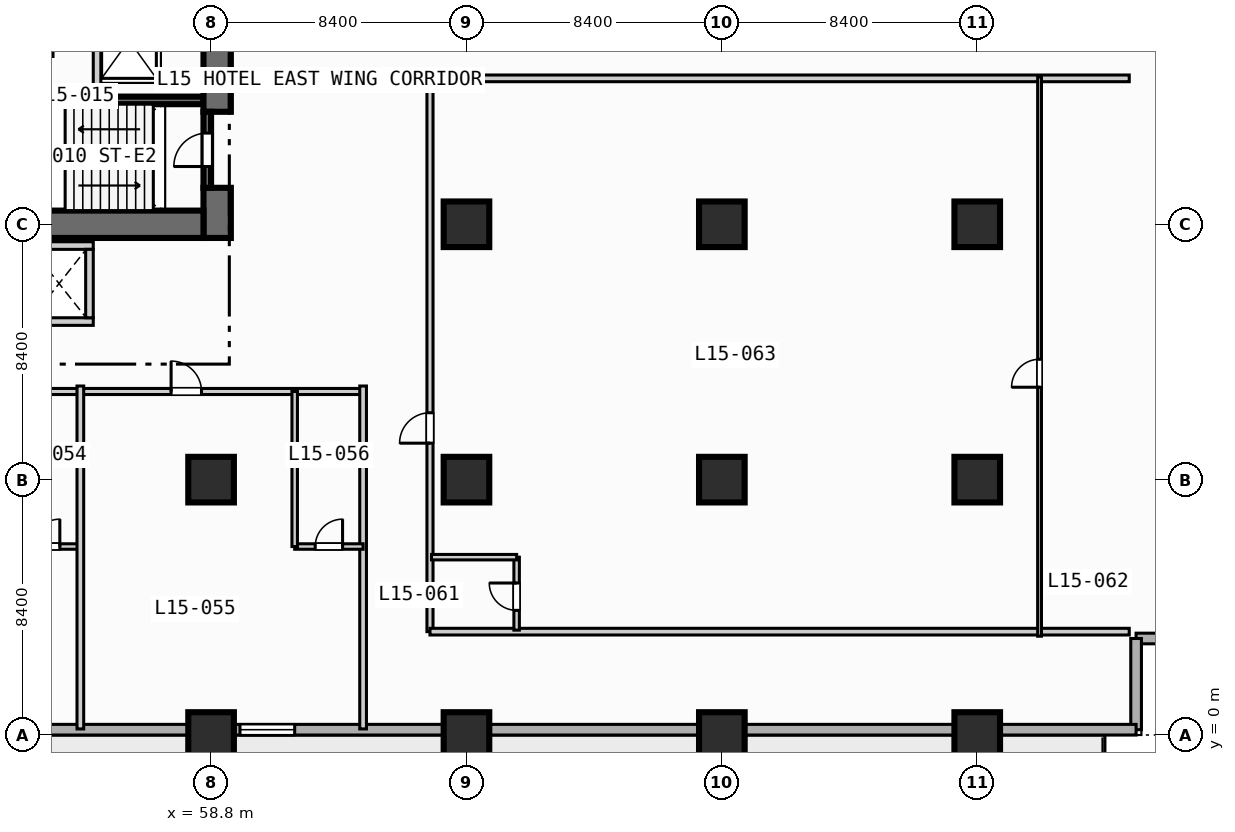
"""IFC4 building model, lengths in metres.
Left out: names, types, materials, properties, quantities, classifications, styles, units other than length and angle.
Written with IfcOpenShell. Run it as: python <this file> out.ifc"""

import sys

from ifc_helpers import new_model, si_unit, direction, frame, frame_2d, origin, origin_2d, place, context, subcontext, project, spatial, rectangle, extrude, element, fill, save


model = new_model("IFC4")
c1 = context("Model", 3, precision=1e-05, world=origin(), true_north=direction((0.0, 1.0)))
c2 = subcontext(c1, "Body", "Model", "MODEL_VIEW")
j1 = project(units=[si_unit("LENGTHUNIT", "METRE"), si_unit("PLANEANGLEUNIT", "RADIAN")], contexts=[c1])
p1 = place(None, origin())
s1 = spatial("IfcSite", under=j1, at=p1, CompositionType="ELEMENT")
p2 = place(p1, origin())
s2 = spatial("IfcBuilding", under=s1, at=p2, CompositionType="ELEMENT")
p3 = place(p2, frame((0.0, 0.0, 66.2)))
s3 = spatial("IfcBuildingStorey", under=s2, at=p3, CompositionType="ELEMENT", Elevation=66.2)
p4 = place(p3, frame((50.5, 20.875, 0.0), z_axis=(0.0, 0.0, 1.0), x_axis=(1.0, 0.0, 0.0)))
e1 = element("IfcWall", 1, at=p4, inside=s3, PredefinedType="SOLIDWALL", context=c2, shape_type="SweptSolid", body=[
    extrude(rectangle(XDim=8.05, YDim=0.25, at=frame_2d((4.025, 0.0))), origin(), (0.0, 0.0, 1.0), 3.55),
])
p5 = place(p3, frame((59.0, 16.35, 0.0), z_axis=(0.0, 0.0, 1.0), x_axis=(0.0, 1.0, 0.0)))
e2 = element("IfcWall", 2, at=p5, inside=s3, PredefinedType="SHEAR", context=c2, shape_type="SweptSolid", body=[
    extrude(rectangle(XDim=1.65, YDim=0.9, at=frame_2d((0.825, 0.0))), origin(), (0.0, 0.0, 1.0), 3.55),
])
p6 = place(p3, frame((59.0, 20.5, 0.0), z_axis=(0.0, 0.0, 1.0), x_axis=(0.0, 1.0, 0.0)))
e3 = element("IfcWall", 3, at=p6, inside=s3, PredefinedType="SHEAR", context=c2, shape_type="SweptSolid", body=[
    extrude(rectangle(XDim=5.15, YDim=0.9, at=frame_2d((2.575, 0.0))), origin(), (0.0, 0.0, 1.0), 3.55),
])
p7 = place(p3, frame((42.2, 16.8, 0.0), z_axis=(0.0, 0.0, 1.0), x_axis=(1.0, 0.0, 0.0)))
e4 = element("IfcWall", 4, at=p7, inside=s3, PredefinedType="SHEAR", context=c2, shape_type="SweptSolid", body=[
    extrude(rectangle(XDim=16.35, YDim=0.9, at=frame_2d((8.175, 0.0))), origin(), (0.0, 0.0, 1.0), 3.55),
])
for number, where, z_axis, x_axis in (
    (5, (58.8, 0.0, 0.0), (0.0, 0.0, 1.0), (1.0, 0.0, 0.0)),
    (6, (58.8, 8.4, 0.0), (0.0, 0.0, 1.0), (1.0, 0.0, 0.0)),
    (7, (67.2, 0.0, 0.0), (0.0, 0.0, 1.0), (1.0, 0.0, 0.0)),
    (8, (67.2, 8.4, 0.0), (0.0, 0.0, 1.0), (1.0, 0.0, 0.0)),
    (9, (67.2, 16.8, 0.0), (0.0, 0.0, 1.0), (1.0, 0.0, 0.0)),
    (10, (75.6, 0.0, 0.0), (0.0, 0.0, 1.0), (1.0, 0.0, 0.0)),
    (11, (75.6, 8.4, 0.0), (0.0, 0.0, 1.0), (1.0, 0.0, 0.0)),
    (12, (75.6, 16.8, 0.0), (0.0, 0.0, 1.0), (1.0, 0.0, 0.0)),
    (13, (84.0, 0.0, 0.0), (0.0, 0.0, 1.0), (1.0, 0.0, 0.0)),
    (14, (84.0, 8.4, 0.0), (0.0, 0.0, 1.0), (1.0, 0.0, 0.0)),
    (15, (84.0, 16.8, 0.0), (0.0, 0.0, 1.0), (1.0, 0.0, 0.0)),
):
    element("IfcColumn", number, at=place(p3, frame(where, z_axis=z_axis, x_axis=x_axis)), inside=s3, PredefinedType="COLUMN", context=c2, shape_type="SweptSolid", body=[
        extrude(rectangle(XDim=1.5, YDim=1.5, at=origin_2d()), origin(), (0.0, 0.0, 1.0), 3.8),
    ])
for number, where, z_axis, x_axis in (
    (16, (92.225, 3.175, 0.0), (0.0, 0.0, 1.0), (-1.0, 0.0, 0.0)),
    (17, (89.225, 3.175, 0.0), (0.0, 0.0, 1.0), (0.0, -1.0, 0.0)),
):
    element("IfcWall", number, at=place(p3, frame(where, z_axis=z_axis, x_axis=x_axis)), inside=s3, PredefinedType="STANDARD", context=c2, shape_type="SweptSolid", body=[
        extrude(rectangle(XDim=3.0, YDim=0.35, at=frame_2d((1.5, 0.0))), origin(), (0.0, 0.0, 1.0), 3.55),
    ])
p8 = place(p3, frame((89.225, 0.175, 0.0), z_axis=(0.0, 0.0, 1.0), x_axis=(-1.0, 0.0, 0.0)))
e18 = element("IfcWall", 18, at=p8, inside=s3, PredefinedType="STANDARD", context=c2, shape_type="SweptSolid", body=[
    extrude(rectangle(XDim=86.05, YDim=0.35, at=frame_2d((43.025, 0.0))), origin(), (0.0, 0.0, 1.0), 3.55),
])
p9 = place(p8, frame((67.525, 0.0, 0.0)))
e19 = element("IfcOpeningElement", 19, at=p9, cuts=e18, PredefinedType="OPENING", context=c2, shape_type="SweptSolid", body=[
    extrude(rectangle(XDim=1.4, YDim=2.2, at=frame_2d((0.7, 1.1))), frame((0.0, 0.185, 0.0), z_axis=(0.0, -1.0, 0.0), x_axis=(1.0, 0.0, 0.0)), (0.0, 0.0, 1.0), 0.37),
])
p10 = place(p8, frame((58.725, 0.0, 0.85)))
e20 = element("IfcOpeningElement", 20, at=p10, cuts=e18, PredefinedType="OPENING", context=c2, shape_type="SweptSolid", body=[
    extrude(rectangle(XDim=2.2, YDim=1.8, at=frame_2d((1.1, 0.9))), frame((0.0, 0.185, 0.0), z_axis=(0.0, -1.0, 0.0), x_axis=(1.0, 0.0, 0.0)), (0.0, 0.0, 1.0), 0.37),
])
p11 = place(p8, frame((50.325, 0.0, 0.85)))
e21 = element("IfcOpeningElement", 21, at=p11, cuts=e18, PredefinedType="OPENING", context=c2, shape_type="SweptSolid", body=[
    extrude(rectangle(XDim=2.2, YDim=1.8, at=frame_2d((1.1, 0.9))), frame((0.0, 0.185, 0.0), z_axis=(0.0, -1.0, 0.0), x_axis=(1.0, 0.0, 0.0)), (0.0, 0.0, 1.0), 0.37),
])
p12 = place(p8, frame((41.925, 0.0, 0.85)))
e22 = element("IfcOpeningElement", 22, at=p12, cuts=e18, PredefinedType="OPENING", context=c2, shape_type="SweptSolid", body=[
    extrude(rectangle(XDim=2.2, YDim=1.8, at=frame_2d((1.1, 0.9))), frame((0.0, 0.185, 0.0), z_axis=(0.0, -1.0, 0.0), x_axis=(1.0, 0.0, 0.0)), (0.0, 0.0, 1.0), 0.37),
])
p13 = place(p8, frame((27.675, 0.0, 0.85)))
e23 = element("IfcOpeningElement", 23, at=p13, cuts=e18, PredefinedType="OPENING", context=c2, shape_type="SweptSolid", body=[
    extrude(rectangle(XDim=1.8, YDim=1.8, at=frame_2d((0.9, 0.9))), frame((0.0, 0.185, 0.0), z_axis=(0.0, -1.0, 0.0), x_axis=(1.0, 0.0, 0.0)), (0.0, 0.0, 1.0), 0.37),
])
p14 = place(p3, frame((58.675, 18.0, 0.0), z_axis=(0.0, 0.0, 1.0), x_axis=(0.0, 1.0, 0.0)))
e24 = element("IfcWall", 24, at=p14, inside=s3, PredefinedType="SOLIDWALL", context=c2, shape_type="SweptSolid", body=[
    extrude(rectangle(XDim=2.5, YDim=0.25, at=frame_2d((1.25, 0.0))), origin(), (0.0, 0.0, 1.0), 3.55),
])
p15 = place(p14, frame((0.7, 0.0, 0.0)))
e25 = element("IfcOpeningElement", 25, at=p15, cuts=e24, PredefinedType="OPENING", context=c2, shape_type="SweptSolid", body=[
    extrude(rectangle(XDim=1.1, YDim=2.15, at=frame_2d((0.55, 1.075))), frame((0.0, 0.135, 0.0), z_axis=(0.0, -1.0, 0.0), x_axis=(1.0, 0.0, 0.0)), (0.0, 0.0, 1.0), 0.27),
])
p16 = place(p3, frame((55.05, 21.0, 0.0), z_axis=(0.0, 0.0, 1.0), x_axis=(0.0, 1.0, 0.0)))
e26 = element("IfcWall", 26, at=p16, inside=s3, PredefinedType="SOLIDWALL", context=c2, shape_type="SweptSolid", body=[
    extrude(rectangle(XDim=4.15, YDim=0.25, at=frame_2d((2.075, 0.0))), origin(), (0.0, 0.0, 1.0), 3.55),
])
p17 = place(p16, frame((1.85, 0.0, 0.0)))
e27 = element("IfcOpeningElement", 27, at=p17, cuts=e26, PredefinedType="OPENING", context=c2, shape_type="SweptSolid", body=[
    extrude(rectangle(XDim=1.1, YDim=2.15, at=frame_2d((0.55, 1.075))), frame((0.0, 0.135, 0.0), z_axis=(0.0, -1.0, 0.0), x_axis=(1.0, 0.0, 0.0)), (0.0, 0.0, 1.0), 0.27),
])
p18 = place(p3, frame((53.52, 22.32, 0.0), z_axis=(0.0, 0.0, 1.0), x_axis=(0.0, 1.0, 0.0)))
e28 = element("IfcWall", 28, at=p18, inside=s3, PredefinedType="PARTITIONING", context=c2, shape_type="SweptSolid", body=[
    extrude(rectangle(XDim=2.4, YDim=0.16, at=frame_2d((1.2, 0.0))), origin(), (0.0, 0.0, 1.0), 3.55),
])
p19 = place(p18, frame((0.65, 0.0, 0.0)))
e29 = element("IfcOpeningElement", 29, at=p19, cuts=e28, PredefinedType="OPENING", context=c2, shape_type="SweptSolid", body=[
    extrude(rectangle(XDim=0.9, YDim=2.1, at=frame_2d((0.45, 1.05))), frame((0.0, 0.09, 0.0), z_axis=(0.0, -1.0, 0.0), x_axis=(1.0, 0.0, 0.0)), (0.0, 0.0, 1.0), 0.18),
])
for number, where, z_axis, x_axis in (
    (30, (52.675, 13.6, 0.0), (0.0, 0.0, 1.0), (1.0, 0.0, 0.0)),
    (31, (52.675, 16.1, 0.0), (0.0, 0.0, 1.0), (1.0, 0.0, 0.0)),
    (32, (54.8, 13.725, 0.0), (0.0, 0.0, 1.0), (0.0, 1.0, 0.0)),
):
    element("IfcWall", number, at=place(p3, frame(where, z_axis=z_axis, x_axis=x_axis)), inside=s3, PredefinedType="SOLIDWALL", context=c2, shape_type="SweptSolid", body=[
        extrude(rectangle(XDim=2.25, YDim=0.25, at=frame_2d((1.125, 0.0))), origin(), (0.0, 0.0, 1.0), 3.55),
    ])
p20 = place(p3, frame((13.7, 11.3, 0.0), z_axis=(0.0, 0.0, 1.0), x_axis=(1.0, 0.0, 0.0)))
e33 = element("IfcWall", 33, at=p20, inside=s3, PredefinedType="PARTITIONING", context=c2, shape_type="SweptSolid", body=[
    extrude(rectangle(XDim=50.1, YDim=0.2, at=frame_2d((25.05, 0.0))), origin(), (0.0, 0.0, 1.0), 3.55),
])
p21 = place(p20, frame((3.61, 0.0, 0.0)))
e34 = element("IfcOpeningElement", 34, at=p21, cuts=e33, PredefinedType="OPENING", context=c2, shape_type="SweptSolid", body=[
    extrude(rectangle(XDim=1.0, YDim=2.15, at=frame_2d((0.5, 1.075))), frame((0.0, 0.11, 0.0), z_axis=(0.0, -1.0, 0.0), x_axis=(1.0, 0.0, 0.0)), (0.0, 0.0, 1.0), 0.22),
])
p22 = place(p20, frame((16.81, 0.0, 0.0)))
e35 = element("IfcOpeningElement", 35, at=p22, cuts=e33, PredefinedType="OPENING", context=c2, shape_type="SweptSolid", body=[
    extrude(rectangle(XDim=1.0, YDim=2.15, at=frame_2d((0.5, 1.075))), frame((0.0, 0.11, 0.0), z_axis=(0.0, -1.0, 0.0), x_axis=(1.0, 0.0, 0.0)), (0.0, 0.0, 1.0), 0.22),
])
p23 = place(p20, frame((31.935, 0.0, 0.0)))
e36 = element("IfcOpeningElement", 36, at=p23, cuts=e33, PredefinedType="OPENING", context=c2, shape_type="SweptSolid", body=[
    extrude(rectangle(XDim=1.0, YDim=2.15, at=frame_2d((0.5, 1.075))), frame((0.0, 0.11, 0.0), z_axis=(0.0, -1.0, 0.0), x_axis=(1.0, 0.0, 0.0)), (0.0, 0.0, 1.0), 0.22),
])
p24 = place(p20, frame((43.785, 0.0, 0.0)))
e37 = element("IfcOpeningElement", 37, at=p24, cuts=e33, PredefinedType="OPENING", context=c2, shape_type="SweptSolid", body=[
    extrude(rectangle(XDim=1.0, YDim=2.15, at=frame_2d((0.5, 1.075))), frame((0.0, 0.11, 0.0), z_axis=(0.0, -1.0, 0.0), x_axis=(1.0, 0.0, 0.0)), (0.0, 0.0, 1.0), 0.22),
])
p25 = place(p3, frame((52.25, 6.2, 0.0), z_axis=(0.0, 0.0, 1.0), x_axis=(1.0, 0.0, 0.0)))
e38 = element("IfcWall", 38, at=p25, inside=s3, PredefinedType="PLUMBINGWALL", context=c2, shape_type="SweptSolid", body=[
    extrude(rectangle(XDim=2.25, YDim=0.18, at=frame_2d((1.125, 0.0))), origin(), (0.0, 0.0, 1.0), 3.55),
])
p26 = place(p25, frame((0.675, 0.0, 0.0)))
e39 = element("IfcOpeningElement", 39, at=p26, cuts=e38, PredefinedType="OPENING", context=c2, shape_type="SweptSolid", body=[
    extrude(rectangle(XDim=0.9, YDim=2.1, at=frame_2d((0.45, 1.05))), frame((0.0, 0.1, 0.0), z_axis=(0.0, -1.0, 0.0), x_axis=(1.0, 0.0, 0.0)), (0.0, 0.0, 1.0), 0.2),
])
for number, where, z_axis, x_axis in (
    (40, (54.5, 0.2, 0.0), (0.0, 0.0, 1.0), (0.0, 1.0, 0.0)),
    (41, (63.8, 0.2, 0.0), (0.0, 0.0, 1.0), (0.0, 1.0, 0.0)),
):
    element("IfcWall", number, at=place(p3, frame(where, z_axis=z_axis, x_axis=x_axis)), inside=s3, PredefinedType="PARTITIONING", context=c2, shape_type="SweptSolid", body=[
        extrude(rectangle(XDim=11.28, YDim=0.22, at=frame_2d((5.64, 0.0))), origin(), (0.0, 0.0, 1.0), 3.55),
    ])
p27 = place(p3, frame((61.55, 6.2, 0.0), z_axis=(0.0, 0.0, 1.0), x_axis=(1.0, 0.0, 0.0)))
e42 = element("IfcWall", 42, at=p27, inside=s3, PredefinedType="PLUMBINGWALL", context=c2, shape_type="SweptSolid", body=[
    extrude(rectangle(XDim=2.25, YDim=0.18, at=frame_2d((1.125, 0.0))), origin(), (0.0, 0.0, 1.0), 3.55),
])
p28 = place(p27, frame((0.675, 0.0, 0.0)))
e43 = element("IfcOpeningElement", 43, at=p28, cuts=e42, PredefinedType="OPENING", context=c2, shape_type="SweptSolid", body=[
    extrude(rectangle(XDim=0.9, YDim=2.1, at=frame_2d((0.45, 1.05))), frame((0.0, 0.1, 0.0), z_axis=(0.0, -1.0, 0.0), x_axis=(1.0, 0.0, 0.0)), (0.0, 0.0, 1.0), 0.2),
])
p29 = place(p3, frame((61.55, 6.2, 0.0), z_axis=(0.0, 0.0, 1.0), x_axis=(0.0, 1.0, 0.0)))
e44 = element("IfcWall", 44, at=p29, inside=s3, PredefinedType="PLUMBINGWALL", context=c2, shape_type="SweptSolid", body=[
    extrude(rectangle(XDim=5.1, YDim=0.18, at=frame_2d((2.55, 0.0))), origin(), (0.0, 0.0, 1.0), 3.55),
])
p30 = place(p3, frame((66.0, 3.4, 0.0), z_axis=(0.0, 0.0, 1.0), x_axis=(0.0, 1.0, 0.0)))
e45 = element("IfcWall", 45, at=p30, inside=s3, PredefinedType="PARTITIONING", context=c2, shape_type="SweptSolid", body=[
    extrude(rectangle(XDim=18.2, YDim=0.2, at=frame_2d((9.1, 0.0))), origin(), (0.0, 0.0, 1.0), 3.55),
])
p31 = place(p30, frame((6.2, 0.0, 0.0)))
e46 = element("IfcOpeningElement", 46, at=p31, cuts=e45, PredefinedType="OPENING", context=c2, shape_type="SweptSolid", body=[
    extrude(rectangle(XDim=1.0, YDim=2.15, at=frame_2d((0.5, 1.075))), frame((0.0, 0.11, 0.0), z_axis=(0.0, -1.0, 0.0), x_axis=(1.0, 0.0, 0.0)), (0.0, 0.0, 1.0), 0.22),
])
for number, where, z_axis, x_axis in (
    (47, (66.0, 3.4, 0.0), (0.0, 0.0, 1.0), (1.0, 0.0, 0.0)),
    (48, (66.0, 21.6, 0.0), (0.0, 0.0, 1.0), (1.0, 0.0, 0.0)),
):
    element("IfcWall", number, at=place(p3, frame(where, z_axis=z_axis, x_axis=x_axis)), inside=s3, PredefinedType="PARTITIONING", context=c2, shape_type="SweptSolid", body=[
        extrude(rectangle(XDim=23.0, YDim=0.22, at=frame_2d((11.5, 0.0))), origin(), (0.0, 0.0, 1.0), 3.55),
    ])
p32 = place(p3, frame((68.85, 3.45, 0.0), z_axis=(0.0, 0.0, 1.0), x_axis=(0.0, 1.0, 0.0)))
e49 = element("IfcWall", 49, at=p32, inside=s3, PredefinedType="PLUMBINGWALL", context=c2, shape_type="SweptSolid", body=[
    extrude(rectangle(XDim=2.4, YDim=0.18, at=frame_2d((1.2, 0.0))), origin(), (0.0, 0.0, 1.0), 3.55),
])
p33 = place(p32, frame((0.65, 0.0, 0.0)))
e50 = element("IfcOpeningElement", 50, at=p33, cuts=e49, PredefinedType="OPENING", context=c2, shape_type="SweptSolid", body=[
    extrude(rectangle(XDim=0.9, YDim=2.1, at=frame_2d((0.45, 1.05))), frame((0.0, 0.1, 0.0), z_axis=(0.0, -1.0, 0.0), x_axis=(1.0, 0.0, 0.0)), (0.0, 0.0, 1.0), 0.2),
])
p34 = place(p3, frame((66.05, 5.85, 0.0), z_axis=(0.0, 0.0, 1.0), x_axis=(1.0, 0.0, 0.0)))
e51 = element("IfcWall", 51, at=p34, inside=s3, PredefinedType="PLUMBINGWALL", context=c2, shape_type="SweptSolid", body=[
    extrude(rectangle(XDim=2.8, YDim=0.18, at=frame_2d((1.4, 0.0))), origin(), (0.0, 0.0, 1.0), 3.55),
])
p35 = place(p3, frame((86.05, 3.25, 0.0), z_axis=(0.0, 0.0, 1.0), x_axis=(0.0, 1.0, 0.0)))
e52 = element("IfcWall", 52, at=p35, inside=s3, PredefinedType="PARTITIONING", context=c2, shape_type="SweptSolid", body=[
    extrude(rectangle(XDim=18.4, YDim=0.125, at=frame_2d((9.2, 0.0))), origin(), (0.0, 0.0, 1.0), 3.55),
])
p36 = place(p35, frame((8.19, 0.0, 0.0)))
e53 = element("IfcOpeningElement", 53, at=p36, cuts=e52, PredefinedType="OPENING", context=c2, shape_type="SweptSolid", body=[
    extrude(rectangle(XDim=0.92, YDim=2.1, at=frame_2d((0.46, 1.05))), frame((0.0, 0.073, 0.0), z_axis=(0.0, -1.0, 0.0), x_axis=(1.0, 0.0, 0.0)), (0.0, 0.0, 1.0), 0.145),
])
p37 = place(p13, origin())
e54 = element("IfcWindow", 54, at=p37, inside=s3, PartitioningType="SINGLE_PANEL", PredefinedType="WINDOW", context=c2, shape_type="SweptSolid", body=[
    extrude(rectangle(XDim=1.8, YDim=1.8, at=frame_2d((0.9, 0.9))), frame((0.0, 0.03, 0.0), z_axis=(0.0, -1.0, 0.0), x_axis=(1.0, 0.0, 0.0)), (0.0, 0.0, 1.0), 0.06),
])
fill(e23, e54)
p38 = place(p15, origin())
e55 = element("IfcDoor", 55, at=p38, inside=s3, OperationType="SINGLE_SWING_LEFT", PredefinedType="DOOR", context=c2, shape_type="SweptSolid", body=[
    extrude(rectangle(XDim=1.1, YDim=2.15, at=frame_2d((0.55, 1.075))), frame((0.0, 0.025, 0.0), z_axis=(0.0, -1.0, 0.0), x_axis=(1.0, 0.0, 0.0)), (0.0, 0.0, 1.0), 0.05),
])
fill(e25, e55)
p39 = place(p24, origin())
e56 = element("IfcDoor", 56, at=p39, inside=s3, OperationType="SINGLE_SWING_LEFT", PredefinedType="DOOR", context=c2, shape_type="SweptSolid", body=[
    extrude(rectangle(XDim=1.0, YDim=2.15, at=frame_2d((0.5, 1.075))), frame((0.0, 0.025, 0.0), z_axis=(0.0, -1.0, 0.0), x_axis=(1.0, 0.0, 0.0)), (0.0, 0.0, 1.0), 0.05),
])
fill(e37, e56)
p40 = place(p26, origin())
e57 = element("IfcDoor", 57, at=p40, inside=s3, OperationType="SINGLE_SWING_RIGHT", PredefinedType="DOOR", context=c2, shape_type="SweptSolid", body=[
    extrude(rectangle(XDim=0.9, YDim=2.1, at=frame_2d((0.45, 1.05))), frame((0.0, 0.025, 0.0), z_axis=(0.0, -1.0, 0.0), x_axis=(1.0, 0.0, 0.0)), (0.0, 0.0, 1.0), 0.05),
])
fill(e39, e57)
p41 = place(p28, origin())
e58 = element("IfcDoor", 58, at=p41, inside=s3, OperationType="SINGLE_SWING_RIGHT", PredefinedType="DOOR", context=c2, shape_type="SweptSolid", body=[
    extrude(rectangle(XDim=0.9, YDim=2.1, at=frame_2d((0.45, 1.05))), frame((0.0, 0.025, 0.0), z_axis=(0.0, -1.0, 0.0), x_axis=(1.0, 0.0, 0.0)), (0.0, 0.0, 1.0), 0.05),
])
fill(e43, e58)
p42 = place(p31, origin())
e59 = element("IfcDoor", 59, at=p42, inside=s3, OperationType="SINGLE_SWING_LEFT", PredefinedType="DOOR", context=c2, shape_type="SweptSolid", body=[
    extrude(rectangle(XDim=1.0, YDim=2.15, at=frame_2d((0.5, 1.075))), frame((0.0, 0.025, 0.0), z_axis=(0.0, -1.0, 0.0), x_axis=(1.0, 0.0, 0.0)), (0.0, 0.0, 1.0), 0.05),
])
fill(e46, e59)
p43 = place(p33, origin())
e60 = element("IfcDoor", 60, at=p43, inside=s3, OperationType="SINGLE_SWING_RIGHT", PredefinedType="DOOR", context=c2, shape_type="SweptSolid", body=[
    extrude(rectangle(XDim=0.9, YDim=2.1, at=frame_2d((0.45, 1.05))), frame((0.0, 0.025, 0.0), z_axis=(0.0, -1.0, 0.0), x_axis=(1.0, 0.0, 0.0)), (0.0, 0.0, 1.0), 0.05),
])
fill(e50, e60)
p44 = place(p36, origin())
e61 = element("IfcDoor", 61, at=p44, inside=s3, OperationType="SINGLE_SWING_LEFT", PredefinedType="DOOR", context=c2, shape_type="SweptSolid", body=[
    extrude(rectangle(XDim=0.92, YDim=2.1, at=frame_2d((0.46, 1.05))), frame((0.0, 0.025, 0.0), z_axis=(0.0, -1.0, 0.0), x_axis=(1.0, 0.0, 0.0)), (0.0, 0.0, 1.0), 0.05),
])
fill(e53, e61)
save(model, sys.argv[1])
